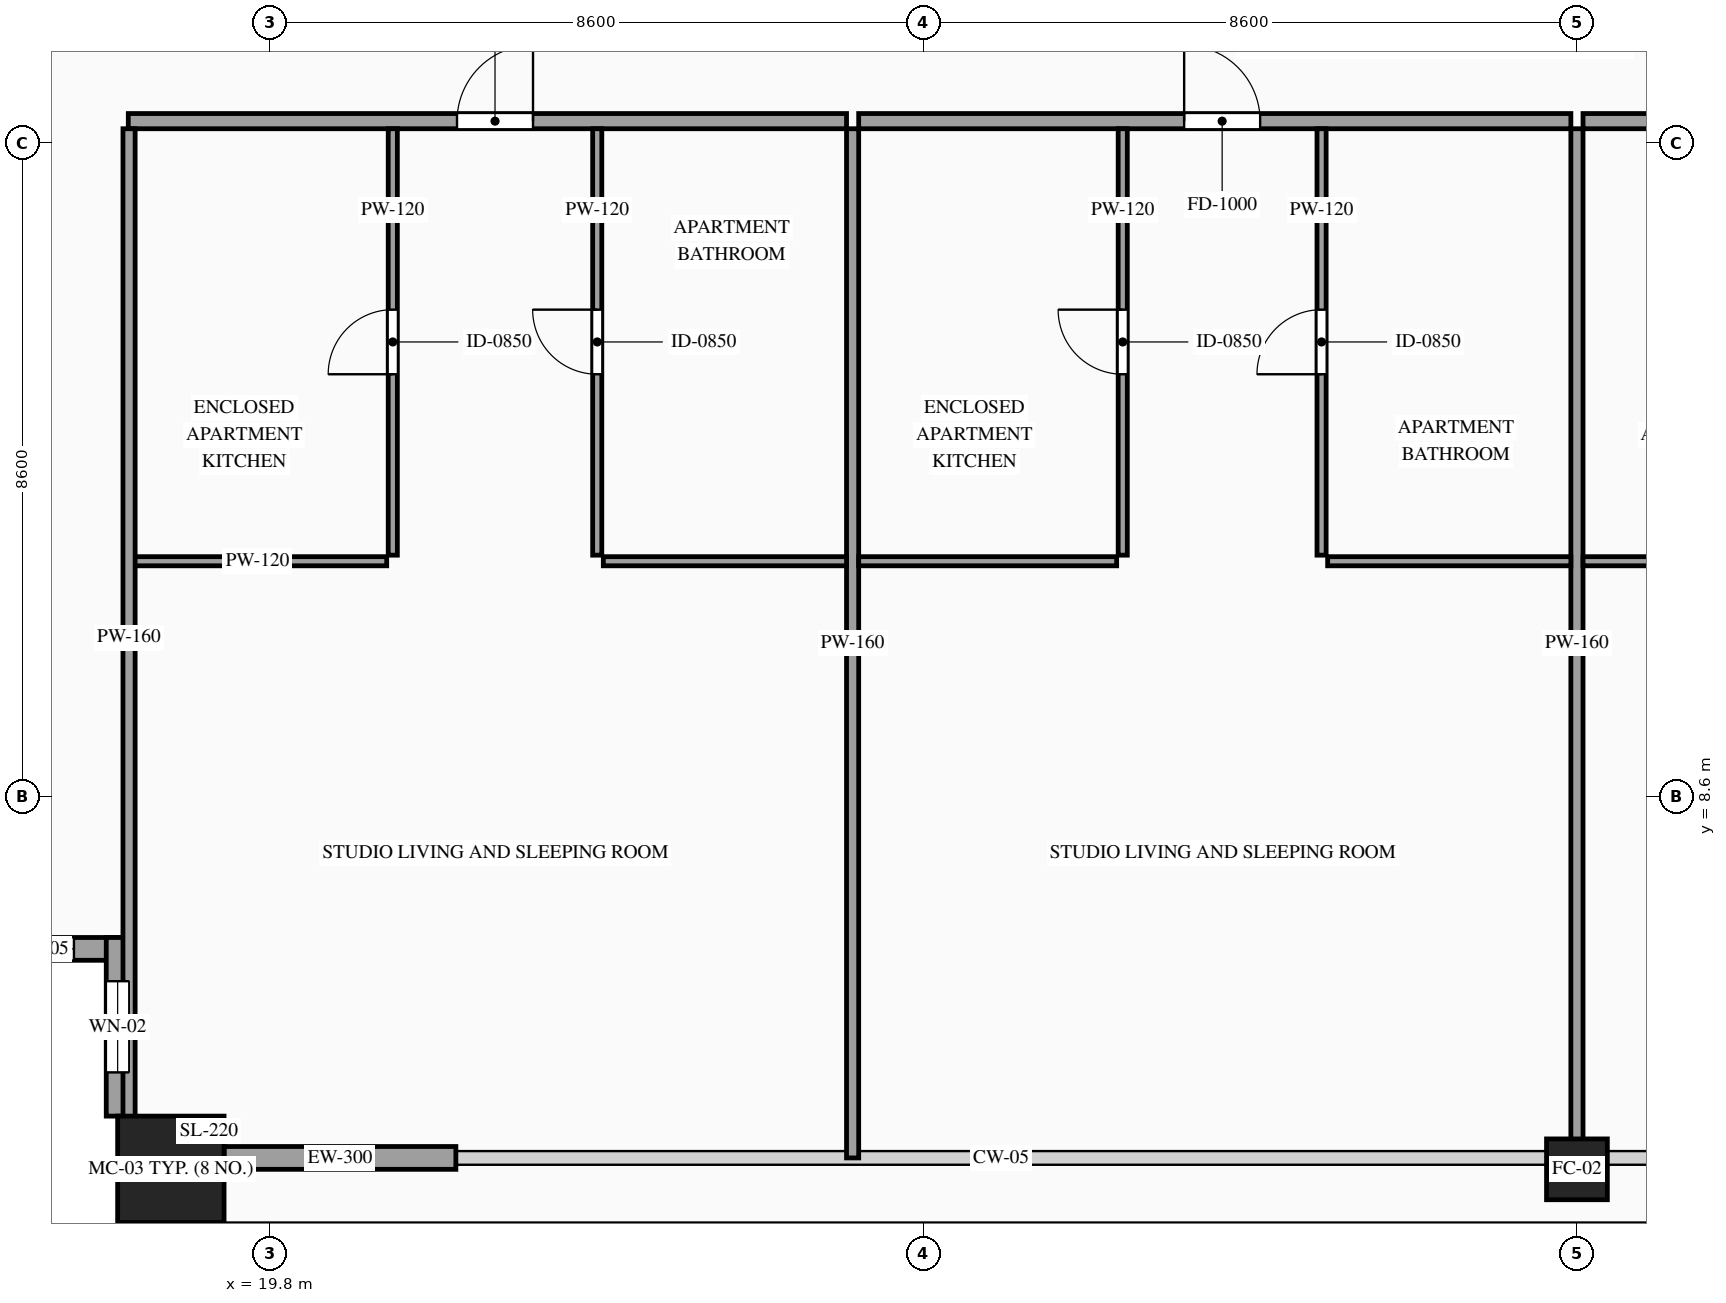
"""IFC4 building model, lengths in metres.
Left out: names, types, materials, properties, quantities, classifications, styles, units other than length and angle.
Written with IfcOpenShell. Run it as: python <this file> out.ifc"""

import sys

from ifc_helpers import new_model, si_unit, direction, frame, frame_2d, origin, origin_2d, place, context, subcontext, project, spatial, rectangle, hollow_rectangle, extrude, source, transform, mapped, element, fill, save


model = new_model("IFC4")
c1 = context("Model", 3, precision=1e-05, world=origin(), true_north=direction((0.0, 1.0)))
c2 = subcontext(c1, "Body", "Model", "MODEL_VIEW")
j1 = project(units=[si_unit("LENGTHUNIT", "METRE"), si_unit("PLANEANGLEUNIT", "RADIAN")], contexts=[c1])
p1 = place(None, origin())
s1 = spatial("IfcSite", under=j1, at=p1, CompositionType="ELEMENT")
p2 = place(p1, origin())
s2 = spatial("IfcBuilding", under=s1, at=p2, CompositionType="ELEMENT")
p3 = place(p2, frame((0.0, 0.0, 188.0)))
s3 = spatial("IfcBuildingStorey", under=s2, at=p3, CompositionType="ELEMENT", Elevation=188.0)
m1 = source(origin(), c2, "Body", "SweptSolid", [
    extrude(hollow_rectangle(XDim=1.4, YDim=1.4, WallThickness=0.06, at=origin_2d()), origin(), (0.0, 0.0, 1.0), 3.5),
])
p4 = place(p3, frame((18.5, 3.7, 0.0), z_axis=(0.0, 0.0, 1.0), x_axis=(1.0, 0.0, 0.0)))
e1 = element("IfcColumn", 1, at=p4, inside=s3, PredefinedType="COLUMN", context=c2, shape_type="MappedRepresentation", body=[
    mapped(m1, transform((0.0, 0.0, 0.0), scale=1.0)),
])
m2 = source(origin(), c2, "Body", "SweptSolid", [
    extrude(hollow_rectangle(XDim=0.8, YDim=0.8, WallThickness=0.036, at=origin_2d()), origin(), (0.0, 0.0, 1.0), 3.5),
])
p5 = place(p3, frame((37.0, 3.7, 0.0), z_axis=(0.0, 0.0, 1.0), x_axis=(1.0, 0.0, 0.0)))
e2 = element("IfcColumn", 2, at=p5, inside=s3, PredefinedType="COLUMN", context=c2, shape_type="MappedRepresentation", body=[
    mapped(m2, transform((0.0, 0.0, 0.0), scale=1.0)),
])
p6 = place(p3, frame((15.6, 6.6, 0.0), z_axis=(0.0, 0.0, 1.0), x_axis=(1.0, 0.0, 0.0)))
e3 = element("IfcWall", 3, at=p6, inside=s3, PredefinedType="SOLIDWALL", context=c2, shape_type="SweptSolid", body=[
    extrude(rectangle(XDim=2.35, YDim=0.3, at=frame_2d((1.175, 0.0))), origin(), (0.0, 0.0, 1.0), 3.28),
])
p7 = place(p6, frame((0.725, 0.0, 0.85)))
e4 = element("IfcOpeningElement", 4, at=p7, cuts=e3, PredefinedType="OPENING", context=c2, shape_type="SweptSolid", body=[
    extrude(rectangle(XDim=0.9, YDim=1.5, at=frame_2d((0.45, 0.75))), frame((0.0, 0.165, 0.0), z_axis=(0.0, -1.0, 0.0), x_axis=(1.0, 0.0, 0.0)), (0.0, 0.0, 1.0), 0.33),
])
p8 = place(p3, frame((17.8, 6.75, 0.0), z_axis=(0.0, 0.0, 1.0), x_axis=(0.0, -1.0, 0.0)))
e5 = element("IfcWall", 5, at=p8, inside=s3, PredefinedType="SOLIDWALL", context=c2, shape_type="SweptSolid", body=[
    extrude(rectangle(XDim=2.35, YDim=0.3, at=frame_2d((1.175, 0.0))), origin(), (0.0, 0.0, 1.0), 3.28),
])
p9 = place(p8, frame((0.575, 0.0, 0.85)))
e6 = element("IfcOpeningElement", 6, at=p9, cuts=e5, PredefinedType="OPENING", context=c2, shape_type="SweptSolid", body=[
    extrude(rectangle(XDim=1.2, YDim=2.1, at=frame_2d((0.6, 1.05))), frame((0.0, 0.165, 0.0), z_axis=(0.0, -1.0, 0.0), x_axis=(1.0, 0.0, 0.0)), (0.0, 0.0, 1.0), 0.33),
])
m3 = source(origin(), c2, "Body", "SweptSolid", [
    extrude(rectangle(XDim=3.05, YDim=0.3, at=frame_2d((1.525, 0.0))), origin(), (0.0, 0.0, 1.0), 2.835),
])
p10 = place(p3, frame((19.2, 3.85, 0.0), z_axis=(0.0, 0.0, 1.0), x_axis=(1.0, 0.0, 0.0)))
e7 = element("IfcWall", 7, at=p10, inside=s3, PredefinedType="SOLIDWALL", context=c2, shape_type="MappedRepresentation", body=[
    mapped(m3, transform((0.0, 0.0, 0.0), scale=1.0)),
])
p11 = place(p3, frame((17.94, 17.49, 0.0), z_axis=(0.0, 0.0, 1.0), x_axis=(1.0, 0.0, 0.0)))
e8 = element("IfcWall", 8, at=p11, inside=s3, PredefinedType="PARTITIONING", context=c2, shape_type="SweptSolid", body=[
    extrude(rectangle(XDim=9.45, YDim=0.2, at=frame_2d((4.725, 0.0))), origin(), (0.0, 0.0, 1.0), 3.28),
])
p12 = place(p11, frame((4.325, 0.0, 0.0)))
e9 = element("IfcOpeningElement", 9, at=p12, cuts=e8, PredefinedType="OPENING", context=c2, shape_type="SweptSolid", body=[
    extrude(rectangle(XDim=1.0, YDim=2.2, at=frame_2d((0.5, 1.1))), frame((0.0, 0.115, 0.0), z_axis=(0.0, -1.0, 0.0), x_axis=(1.0, 0.0, 0.0)), (0.0, 0.0, 1.0), 0.23),
])
m4 = source(origin(), c2, "Body", "SweptSolid", [
    extrude(rectangle(XDim=13.54, YDim=0.16, at=frame_2d((6.77, 0.0))), origin(), (0.0, 0.0, 1.0), 3.28),
])
p13 = place(p3, frame((27.47, 3.85, 0.0), z_axis=(0.0, 0.0, 1.0), x_axis=(0.0, 1.0, 0.0)))
e10 = element("IfcWall", 10, at=p13, inside=s3, PredefinedType="PARTITIONING", context=c2, shape_type="MappedRepresentation", body=[
    mapped(m4, transform((0.0, 0.0, 0.0), scale=1.0)),
])
m5 = source(origin(), c2, "Body", "SweptSolid", [
    extrude(rectangle(XDim=3.4, YDim=0.12, at=frame_2d((1.7, 0.0))), origin(), (0.0, 0.0, 1.0), 3.28),
])
p14 = place(p3, frame((17.94, 11.7, 0.0), z_axis=(0.0, 0.0, 1.0), x_axis=(1.0, 0.0, 0.0)))
e11 = element("IfcWall", 11, at=p14, inside=s3, PredefinedType="PARTITIONING", context=c2, shape_type="MappedRepresentation", body=[
    mapped(m5, transform((0.0, 0.0, 0.0), scale=1.0)),
])
p15 = place(p3, frame((21.42, 11.78, 0.0), z_axis=(0.0, 0.0, 1.0), x_axis=(0.0, 1.0, 0.0)))
e12 = element("IfcWall", 12, at=p15, inside=s3, PredefinedType="PARTITIONING", context=c2, shape_type="SweptSolid", body=[
    extrude(rectangle(XDim=5.61, YDim=0.12, at=frame_2d((2.805, 0.0))), origin(), (0.0, 0.0, 1.0), 3.28),
])
p16 = place(p15, frame((2.38, 0.0, 0.0)))
e13 = element("IfcOpeningElement", 13, at=p16, cuts=e12, PredefinedType="OPENING", context=c2, shape_type="SweptSolid", body=[
    extrude(rectangle(XDim=0.85, YDim=2.1, at=frame_2d((0.425, 1.05))), frame((0.0, 0.075, 0.0), z_axis=(0.0, -1.0, 0.0), x_axis=(1.0, 0.0, 0.0)), (0.0, 0.0, 1.0), 0.15),
])
m6 = source(origin(), c2, "Body", "SweptSolid", [
    extrude(rectangle(XDim=3.2, YDim=0.12, at=frame_2d((1.6, 0.0))), origin(), (0.0, 0.0, 1.0), 2.875),
])
p17 = place(p3, frame((24.19, 11.7, 0.0), z_axis=(0.0, 0.0, 1.0), x_axis=(1.0, 0.0, 0.0)))
e14 = element("IfcWall", 14, at=p17, inside=s3, PredefinedType="PARTITIONING", context=c2, shape_type="MappedRepresentation", body=[
    mapped(m6, transform((0.0, 0.0, 0.0), scale=1.0)),
])
p18 = place(p3, frame((24.11, 11.78, 0.0), z_axis=(0.0, 0.0, 1.0), x_axis=(0.0, 1.0, 0.0)))
e15 = element("IfcWall", 15, at=p18, inside=s3, PredefinedType="PARTITIONING", context=c2, shape_type="SweptSolid", body=[
    extrude(rectangle(XDim=5.61, YDim=0.12, at=frame_2d((2.805, 0.0))), origin(), (0.0, 0.0, 1.0), 3.28),
])
p19 = place(p18, frame((2.38, 0.0, 0.0)))
e16 = element("IfcOpeningElement", 16, at=p19, cuts=e15, PredefinedType="OPENING", context=c2, shape_type="SweptSolid", body=[
    extrude(rectangle(XDim=0.85, YDim=2.1, at=frame_2d((0.425, 1.05))), frame((0.0, 0.075, 0.0), z_axis=(0.0, -1.0, 0.0), x_axis=(1.0, 0.0, 0.0)), (0.0, 0.0, 1.0), 0.15),
])
p20 = place(p3, frame((27.55, 17.49, 0.0), z_axis=(0.0, 0.0, 1.0), x_axis=(1.0, 0.0, 0.0)))
e17 = element("IfcWall", 17, at=p20, inside=s3, PredefinedType="PARTITIONING", context=c2, shape_type="SweptSolid", body=[
    extrude(rectangle(XDim=9.37, YDim=0.2, at=frame_2d((4.685, 0.0))), origin(), (0.0, 0.0, 1.0), 3.28),
])
p21 = place(p20, frame((4.282, 0.0, 0.0)))
e18 = element("IfcOpeningElement", 18, at=p21, cuts=e17, PredefinedType="OPENING", context=c2, shape_type="SweptSolid", body=[
    extrude(rectangle(XDim=1.0, YDim=2.2, at=frame_2d((0.5, 1.1))), frame((0.0, 0.115, 0.0), z_axis=(0.0, -1.0, 0.0), x_axis=(1.0, 0.0, 0.0)), (0.0, 0.0, 1.0), 0.23),
])
m7 = source(origin(), c2, "Body", "SweptSolid", [
    extrude(rectangle(XDim=13.54, YDim=0.16, at=frame_2d((6.77, 0.0))), origin(), (0.0, 0.0, 1.0), 2.687),
])
p22 = place(p3, frame((37.0, 3.85, 0.0), z_axis=(0.0, 0.0, 1.0), x_axis=(0.0, 1.0, 0.0)))
e19 = element("IfcWall", 19, at=p22, inside=s3, PredefinedType="PARTITIONING", context=c2, shape_type="MappedRepresentation", body=[
    mapped(m7, transform((0.0, 0.0, 0.0), scale=1.0)),
])
m8 = source(origin(), c2, "Body", "SweptSolid", [
    extrude(rectangle(XDim=3.394, YDim=0.12, at=frame_2d((1.697, 0.0))), origin(), (0.0, 0.0, 1.0), 2.875),
])
p23 = place(p3, frame((27.55, 11.7, 0.0), z_axis=(0.0, 0.0, 1.0), x_axis=(1.0, 0.0, 0.0)))
e20 = element("IfcWall", 20, at=p23, inside=s3, PredefinedType="PARTITIONING", context=c2, shape_type="MappedRepresentation", body=[
    mapped(m8, transform((0.0, 0.0, 0.0), scale=1.0)),
])
p24 = place(p3, frame((31.024, 11.78, 0.0), z_axis=(0.0, 0.0, 1.0), x_axis=(0.0, 1.0, 0.0)))
e21 = element("IfcWall", 21, at=p24, inside=s3, PredefinedType="PARTITIONING", context=c2, shape_type="SweptSolid", body=[
    extrude(rectangle(XDim=5.61, YDim=0.12, at=frame_2d((2.805, 0.0))), origin(), (0.0, 0.0, 1.0), 3.28),
])
p25 = place(p24, frame((2.38, 0.0, 0.0)))
e22 = element("IfcOpeningElement", 22, at=p25, cuts=e21, PredefinedType="OPENING", context=c2, shape_type="SweptSolid", body=[
    extrude(rectangle(XDim=0.85, YDim=2.1, at=frame_2d((0.425, 1.05))), frame((0.0, 0.075, 0.0), z_axis=(0.0, -1.0, 0.0), x_axis=(1.0, 0.0, 0.0)), (0.0, 0.0, 1.0), 0.15),
])
p26 = place(p3, frame((33.72, 11.7, 0.0), z_axis=(0.0, 0.0, 1.0), x_axis=(1.0, 0.0, 0.0)))
e23 = element("IfcWall", 23, at=p26, inside=s3, PredefinedType="PARTITIONING", context=c2, shape_type="MappedRepresentation", body=[
    mapped(m6, transform((0.0, 0.0, 0.0), scale=1.0)),
])
p27 = place(p3, frame((33.64, 11.78, 0.0), z_axis=(0.0, 0.0, 1.0), x_axis=(0.0, 1.0, 0.0)))
e24 = element("IfcWall", 24, at=p27, inside=s3, PredefinedType="PARTITIONING", context=c2, shape_type="SweptSolid", body=[
    extrude(rectangle(XDim=5.61, YDim=0.12, at=frame_2d((2.805, 0.0))), origin(), (0.0, 0.0, 1.0), 3.28),
])
p28 = place(p27, frame((2.38, 0.0, 0.0)))
e25 = element("IfcOpeningElement", 25, at=p28, cuts=e24, PredefinedType="OPENING", context=c2, shape_type="SweptSolid", body=[
    extrude(rectangle(XDim=0.85, YDim=2.1, at=frame_2d((0.425, 1.05))), frame((0.0, 0.075, 0.0), z_axis=(0.0, -1.0, 0.0), x_axis=(1.0, 0.0, 0.0)), (0.0, 0.0, 1.0), 0.15),
])
p29 = place(p3, frame((37.08, 17.49, 0.0), z_axis=(0.0, 0.0, 1.0), x_axis=(1.0, 0.0, 0.0)))
e26 = element("IfcWall", 26, at=p29, inside=s3, PredefinedType="PARTITIONING", context=c2, shape_type="SweptSolid", body=[
    extrude(rectangle(XDim=9.37, YDim=0.2, at=frame_2d((4.685, 0.0))), origin(), (0.0, 0.0, 1.0), 3.28),
])
p30 = place(p29, frame((4.282, 0.0, 0.0)))
e27 = element("IfcOpeningElement", 27, at=p30, cuts=e26, PredefinedType="OPENING", context=c2, shape_type="SweptSolid", body=[
    extrude(rectangle(XDim=1.0, YDim=2.2, at=frame_2d((0.5, 1.1))), frame((0.0, 0.115, 0.0), z_axis=(0.0, -1.0, 0.0), x_axis=(1.0, 0.0, 0.0)), (0.0, 0.0, 1.0), 0.23),
])
p31 = place(p3, frame((37.08, 11.7, 0.0), z_axis=(0.0, 0.0, 1.0), x_axis=(1.0, 0.0, 0.0)))
e28 = element("IfcWall", 28, at=p31, inside=s3, PredefinedType="PARTITIONING", context=c2, shape_type="MappedRepresentation", body=[
    mapped(m8, transform((0.0, 0.0, 0.0), scale=1.0)),
])
m9 = source(origin(), c2, "Body", "SweptSolid", [
    extrude(rectangle(XDim=13.39, YDim=0.16, at=frame_2d((6.695, 0.0))), origin(), (0.0, 0.0, 1.0), 3.28),
])
p32 = place(p3, frame((17.95, 4.0, 0.0), z_axis=(0.0, 0.0, 1.0), x_axis=(0.0, 1.0, 0.0)))
e29 = element("IfcWall", 29, at=p32, inside=s3, PredefinedType="PARTITIONING", context=c2, shape_type="MappedRepresentation", body=[
    mapped(m9, transform((0.0, 0.0, 0.0), scale=1.0)),
])
m10 = source(origin(), c2, "Body", "SweptSolid", [
    extrude(rectangle(XDim=0.9, YDim=1.5, at=frame_2d((0.45, 0.75))), frame((0.0, 0.03, 0.0), z_axis=(0.0, -1.0, 0.0), x_axis=(1.0, 0.0, 0.0)), (0.0, 0.0, 1.0), 0.06),
])
p33 = place(p7, origin())
e30 = element("IfcWindow", 30, at=p33, inside=s3, PartitioningType="SINGLE_PANEL", PredefinedType="WINDOW", context=c2, shape_type="MappedRepresentation", body=[
    mapped(m10, transform((0.0, 0.0, 0.0), scale=1.0)),
])
fill(e4, e30)
m11 = source(origin(), c2, "Body", "SweptSolid", [
    extrude(rectangle(XDim=1.2, YDim=2.1, at=frame_2d((0.6, 1.05))), frame((0.0, 0.03, 0.0), z_axis=(0.0, -1.0, 0.0), x_axis=(1.0, 0.0, 0.0)), (0.0, 0.0, 1.0), 0.06),
])
p34 = place(p9, origin())
e31 = element("IfcWindow", 31, at=p34, inside=s3, PartitioningType="SINGLE_PANEL", PredefinedType="WINDOW", context=c2, shape_type="MappedRepresentation", body=[
    mapped(m11, transform((0.0, 0.0, 0.0), scale=1.0)),
])
fill(e6, e31)
m12 = source(origin(), c2, "Body", "SweptSolid", [
    extrude(rectangle(XDim=1.0, YDim=2.2, at=frame_2d((0.5, 1.1))), frame((0.0, 0.025, 0.0), z_axis=(0.0, -1.0, 0.0), x_axis=(1.0, 0.0, 0.0)), (0.0, 0.0, 1.0), 0.05),
])
p35 = place(p12, origin())
e32 = element("IfcDoor", 32, at=p35, inside=s3, OperationType="SINGLE_SWING_RIGHT", PredefinedType="DOOR", context=c2, shape_type="MappedRepresentation", body=[
    mapped(m12, transform((0.0, 0.0, 0.0), scale=1.0)),
])
fill(e9, e32)
m13 = source(origin(), c2, "Body", "SweptSolid", [
    extrude(rectangle(XDim=0.85, YDim=2.1, at=frame_2d((0.425, 1.05))), frame((0.0, 0.025, 0.0), z_axis=(0.0, -1.0, 0.0), x_axis=(1.0, 0.0, 0.0)), (0.0, 0.0, 1.0), 0.05),
])
p36 = place(p16, origin())
e33 = element("IfcDoor", 33, at=p36, inside=s3, OperationType="SINGLE_SWING_LEFT", PredefinedType="DOOR", context=c2, shape_type="MappedRepresentation", body=[
    mapped(m13, transform((0.0, 0.0, 0.0), scale=1.0)),
])
fill(e13, e33)
p37 = place(p19, origin())
e34 = element("IfcDoor", 34, at=p37, inside=s3, OperationType="SINGLE_SWING_RIGHT", PredefinedType="DOOR", context=c2, shape_type="MappedRepresentation", body=[
    mapped(m13, transform((0.0, 0.0, 0.0), scale=1.0)),
])
fill(e16, e34)
p38 = place(p21, origin())
e35 = element("IfcDoor", 35, at=p38, inside=s3, OperationType="SINGLE_SWING_LEFT", PredefinedType="DOOR", context=c2, shape_type="MappedRepresentation", body=[
    mapped(m12, transform((0.0, 0.0, 0.0), scale=1.0)),
])
fill(e18, e35)
p39 = place(p25, origin())
e36 = element("IfcDoor", 36, at=p39, inside=s3, OperationType="SINGLE_SWING_RIGHT", PredefinedType="DOOR", context=c2, shape_type="MappedRepresentation", body=[
    mapped(m13, transform((0.0, 0.0, 0.0), scale=1.0)),
])
fill(e22, e36)
p40 = place(p28, origin())
e37 = element("IfcDoor", 37, at=p40, inside=s3, OperationType="SINGLE_SWING_LEFT", PredefinedType="DOOR", context=c2, shape_type="MappedRepresentation", body=[
    mapped(m13, transform((0.0, 0.0, 0.0), scale=1.0)),
])
fill(e25, e37)
save(model, sys.argv[1])
